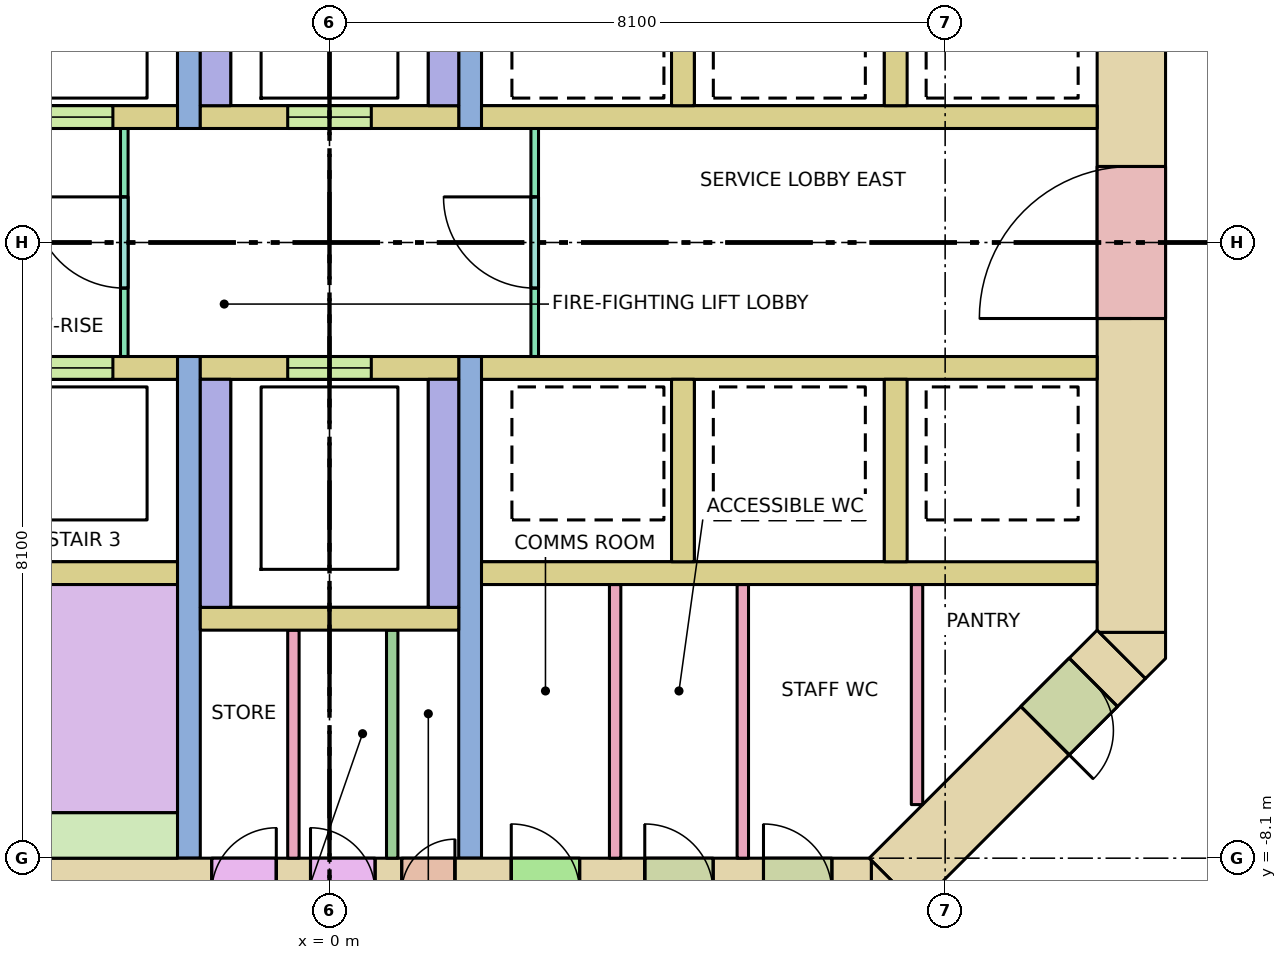
"""IFC4 building model, lengths in metres.
Left out: names, types, materials, properties, quantities, classifications, styles, units other than length and angle.
Written with IfcOpenShell. Run it as: python <this file> out.ifc"""

import sys

from ifc_helpers import new_model, si_unit, direction, frame, frame_2d, origin, place, context, subcontext, project, spatial, polyline, rectangle, outline, extrude, element, fill, save


model = new_model("IFC4")
c1 = context("Model", 3, precision=1e-05, world=origin(), true_north=direction((0.0, 1.0)))
c2 = subcontext(c1, "Body", "Model", "MODEL_VIEW")
j1 = project(units=[si_unit("LENGTHUNIT", "METRE"), si_unit("PLANEANGLEUNIT", "RADIAN")], contexts=[c1])
p1 = place(None, origin())
s1 = spatial("IfcSite", under=j1, at=p1, CompositionType="ELEMENT")
p2 = place(p1, origin())
s2 = spatial("IfcBuilding", under=s1, at=p2, CompositionType="ELEMENT")
p3 = place(p2, frame((0.0, 0.0, 20.0)))
s3 = spatial("IfcBuildingStorey", under=s2, at=p3, CompositionType="ELEMENT", Elevation=20.0)
p4 = place(p3, frame((-7.13, -8.55, -0.32), z_axis=(0.0, 0.0, 1.0), x_axis=(1.0, 0.0, 0.0)))
e1 = element("IfcWall", 1, at=p4, inside=s3, PredefinedType="SHEAR", context=c2, shape_type="SweptSolid", body=[
    extrude(rectangle(XDim=14.26, YDim=0.9, at=frame_2d((7.13, 0.0))), origin(), (0.0, 0.0, 1.0), 7.04),
])
p5 = place(p4, frame((8.08, 0.0, 0.32)))
e2 = element("IfcOpeningElement", 2, at=p5, cuts=e1, PredefinedType="OPENING", context=c2, shape_type="SweptSolid", body=[
    extrude(rectangle(XDim=0.7, YDim=2.1, at=frame_2d((0.35, 1.05))), frame((0.0, 0.46, 0.0), z_axis=(0.0, -1.0, 0.0), x_axis=(1.0, 0.0, 0.0)), (0.0, 0.0, 1.0), 0.92),
])
p6 = place(p4, frame((5.58, 0.0, 0.32)))
e3 = element("IfcOpeningElement", 3, at=p6, cuts=e1, PredefinedType="OPENING", context=c2, shape_type="SweptSolid", body=[
    extrude(rectangle(XDim=0.85, YDim=2.1, at=frame_2d((0.425, 1.05))), frame((0.0, 0.46, 0.0), z_axis=(0.0, -1.0, 0.0), x_axis=(1.0, 0.0, 0.0)), (0.0, 0.0, 1.0), 0.92),
])
p7 = place(p4, frame((6.88, 0.0, 0.32)))
e4 = element("IfcOpeningElement", 4, at=p7, cuts=e1, PredefinedType="OPENING", context=c2, shape_type="SweptSolid", body=[
    extrude(rectangle(XDim=0.85, YDim=2.1, at=frame_2d((0.425, 1.05))), frame((0.0, 0.46, 0.0), z_axis=(0.0, -1.0, 0.0), x_axis=(1.0, 0.0, 0.0)), (0.0, 0.0, 1.0), 0.92),
])
p8 = place(p4, frame((9.521, 0.0, 0.32)))
e5 = element("IfcOpeningElement", 5, at=p8, cuts=e1, PredefinedType="OPENING", context=c2, shape_type="SweptSolid", body=[
    extrude(rectangle(XDim=0.9, YDim=2.1, at=frame_2d((0.45, 1.05))), frame((0.0, 0.46, 0.0), z_axis=(0.0, -1.0, 0.0), x_axis=(1.0, 0.0, 0.0)), (0.0, 0.0, 1.0), 0.92),
])
p9 = place(p4, frame((11.278, 0.0, 0.32)))
e6 = element("IfcOpeningElement", 6, at=p9, cuts=e1, PredefinedType="OPENING", context=c2, shape_type="SweptSolid", body=[
    extrude(rectangle(XDim=0.9, YDim=2.1, at=frame_2d((0.45, 1.05))), frame((0.0, 0.46, 0.0), z_axis=(0.0, -1.0, 0.0), x_axis=(1.0, 0.0, 0.0)), (0.0, 0.0, 1.0), 0.92),
])
p10 = place(p4, frame((12.84, 0.0, 0.32)))
e7 = element("IfcOpeningElement", 7, at=p10, cuts=e1, PredefinedType="OPENING", context=c2, shape_type="SweptSolid", body=[
    extrude(rectangle(XDim=0.9, YDim=2.1, at=frame_2d((0.45, 1.05))), frame((0.0, 0.46, 0.0), z_axis=(0.0, -1.0, 0.0), x_axis=(1.0, 0.0, 0.0)), (0.0, 0.0, 1.0), 0.92),
])
p11 = place(p3, frame((10.55, -5.13, -0.32), z_axis=(0.0, 0.0, 1.0), x_axis=(0.0, 1.0, 0.0)))
e8 = element("IfcWall", 8, at=p11, inside=s3, PredefinedType="SHEAR", context=c2, shape_type="SweptSolid", body=[
    extrude(rectangle(XDim=10.26, YDim=0.9, at=frame_2d((5.13, 0.0))), origin(), (0.0, 0.0, 1.0), 7.04),
])
p12 = place(p11, frame((4.13, 0.0, 0.32)))
e9 = element("IfcOpeningElement", 9, at=p12, cuts=e8, PredefinedType="OPENING", context=c2, shape_type="SweptSolid", body=[
    extrude(rectangle(XDim=2.0, YDim=2.1, at=frame_2d((1.0, 1.05))), frame((0.0, 0.46, 0.0), z_axis=(0.0, -1.0, 0.0), x_axis=(1.0, 0.0, 0.0)), (0.0, 0.0, 1.0), 0.92),
])
p13 = place(p3, frame((10.418, -5.418, -0.32), z_axis=(0.0, 0.0, 1.0), x_axis=(-0.707106781187, -0.707106781187, 0.0)))
e10 = element("IfcWall", 10, at=p13, inside=s3, PredefinedType="SHEAR", context=c2, shape_type="SweptSolid", body=[
    extrude(rectangle(XDim=4.243, YDim=0.9, at=frame_2d((2.121, 0.0))), origin(), (0.0, 0.0, 1.0), 7.04),
])
p14 = place(p13, frame((0.52, 0.0, 0.32)))
e11 = element("IfcOpeningElement", 11, at=p14, cuts=e10, PredefinedType="OPENING", context=c2, shape_type="SweptSolid", body=[
    extrude(rectangle(XDim=0.9, YDim=2.1, at=frame_2d((0.45, 1.05))), frame((0.0, 0.46, 0.0), z_axis=(0.0, -1.0, 0.0), x_axis=(1.0, 0.0, 0.0)), (0.0, 0.0, 1.0), 0.92),
])
p15 = place(p3, frame((0.0, 0.0, -0.32)))
e12 = element("IfcWall", 12, at=p15, inside=s3, PredefinedType="SHEAR", context=c2, shape_type="SweptSolid", body=[
    extrude(outline(polyline([(7.473, -9.0), (7.13, -9.0), (7.13, -8.13), (7.736, -8.736), (7.473, -9.0)])), origin(), (0.0, 0.0, 1.0), 7.04),
])
p16 = place(p3, frame((0.0, 0.0, -0.32)))
e13 = element("IfcWall", 13, at=p16, inside=s3, PredefinedType="SHEAR", context=c2, shape_type="SweptSolid", body=[
    extrude(outline(polyline([(11.0, -5.473), (10.736, -5.736), (10.13, -5.13), (11.0, -5.13), (11.0, -5.473)])), origin(), (0.0, 0.0, 1.0), 7.04),
])
for number, where, z_axis, x_axis in (
    (14, (-10.1, -4.35, 0.0), (0.0, 0.0, 1.0), (1.0, 0.0, 0.0)),
    (15, (2.0, -4.35, 0.0), (0.0, 0.0, 1.0), (1.0, 0.0, 0.0)),
):
    element("IfcWall", number, at=place(p3, frame(where, z_axis=z_axis, x_axis=x_axis)), inside=s3, PredefinedType="SOLIDWALL", context=c2, shape_type="SweptSolid", body=[
        extrude(rectangle(XDim=8.1, YDim=0.3, at=frame_2d((4.05, 0.0))), origin(), (0.0, 0.0, 1.0), 6.72),
    ])
p17 = place(p3, frame((-10.1, 1.65, 0.0), z_axis=(0.0, 0.0, 1.0), x_axis=(1.0, 0.0, 0.0)))
e16 = element("IfcWall", 16, at=p17, inside=s3, PredefinedType="SOLIDWALL", context=c2, shape_type="SweptSolid", body=[
    extrude(rectangle(XDim=8.1, YDim=0.3, at=frame_2d((4.05, 0.0))), origin(), (0.0, 0.0, 1.0), 6.72),
])
p18 = place(p17, frame((0.7, 0.0, 0.0)))
e17 = element("IfcOpeningElement", 17, at=p18, cuts=e16, PredefinedType="OPENING", context=c2, shape_type="SweptSolid", body=[
    extrude(rectangle(XDim=1.1, YDim=2.1, at=frame_2d((0.55, 1.05))), frame((0.0, 0.16, 0.0), z_axis=(0.0, -1.0, 0.0), x_axis=(1.0, 0.0, 0.0)), (0.0, 0.0, 1.0), 0.32),
])
p19 = place(p17, frame((3.5, 0.0, 0.0)))
e18 = element("IfcOpeningElement", 18, at=p19, cuts=e16, PredefinedType="OPENING", context=c2, shape_type="SweptSolid", body=[
    extrude(rectangle(XDim=1.1, YDim=2.1, at=frame_2d((0.55, 1.05))), frame((0.0, 0.16, 0.0), z_axis=(0.0, -1.0, 0.0), x_axis=(1.0, 0.0, 0.0)), (0.0, 0.0, 1.0), 0.32),
])
p20 = place(p17, frame((6.15, 0.0, 0.0)))
e19 = element("IfcOpeningElement", 19, at=p20, cuts=e16, PredefinedType="OPENING", context=c2, shape_type="SweptSolid", body=[
    extrude(rectangle(XDim=1.1, YDim=2.1, at=frame_2d((0.55, 1.05))), frame((0.0, 0.16, 0.0), z_axis=(0.0, -1.0, 0.0), x_axis=(1.0, 0.0, 0.0)), (0.0, 0.0, 1.0), 0.32),
])
p21 = place(p3, frame((-10.1, -1.65, 0.0), z_axis=(0.0, 0.0, 1.0), x_axis=(1.0, 0.0, 0.0)))
e20 = element("IfcWall", 20, at=p21, inside=s3, PredefinedType="SOLIDWALL", context=c2, shape_type="SweptSolid", body=[
    extrude(rectangle(XDim=8.1, YDim=0.3, at=frame_2d((4.05, 0.0))), origin(), (0.0, 0.0, 1.0), 6.72),
])
p22 = place(p21, frame((0.7, 0.0, 0.0)))
e21 = element("IfcOpeningElement", 21, at=p22, cuts=e20, PredefinedType="OPENING", context=c2, shape_type="SweptSolid", body=[
    extrude(rectangle(XDim=1.1, YDim=2.1, at=frame_2d((0.55, 1.05))), frame((0.0, 0.16, 0.0), z_axis=(0.0, -1.0, 0.0), x_axis=(1.0, 0.0, 0.0)), (0.0, 0.0, 1.0), 0.32),
])
p23 = place(p21, frame((3.5, 0.0, 0.0)))
e22 = element("IfcOpeningElement", 22, at=p23, cuts=e20, PredefinedType="OPENING", context=c2, shape_type="SweptSolid", body=[
    extrude(rectangle(XDim=1.1, YDim=2.1, at=frame_2d((0.55, 1.05))), frame((0.0, 0.16, 0.0), z_axis=(0.0, -1.0, 0.0), x_axis=(1.0, 0.0, 0.0)), (0.0, 0.0, 1.0), 0.32),
])
p24 = place(p21, frame((6.15, 0.0, 0.0)))
e23 = element("IfcOpeningElement", 23, at=p24, cuts=e20, PredefinedType="OPENING", context=c2, shape_type="SweptSolid", body=[
    extrude(rectangle(XDim=1.1, YDim=2.1, at=frame_2d((0.55, 1.05))), frame((0.0, 0.16, 0.0), z_axis=(0.0, -1.0, 0.0), x_axis=(1.0, 0.0, 0.0)), (0.0, 0.0, 1.0), 0.32),
])
for number, where, z_axis, x_axis in (
    (24, (2.0, 1.65, 0.0), (0.0, 0.0, 1.0), (1.0, 0.0, 0.0)),
    (25, (2.0, -1.65, 0.0), (0.0, 0.0, 1.0), (1.0, 0.0, 0.0)),
):
    element("IfcWall", number, at=place(p3, frame(where, z_axis=z_axis, x_axis=x_axis)), inside=s3, PredefinedType="SOLIDWALL", context=c2, shape_type="SweptSolid", body=[
        extrude(rectangle(XDim=8.1, YDim=0.3, at=frame_2d((4.05, 0.0))), origin(), (0.0, 0.0, 1.0), 6.72),
    ])
for number, where, z_axis, x_axis in (
    (26, (4.65, 1.8, 0.0), (0.0, 0.0, 1.0), (0.0, 1.0, 0.0)),
    (27, (4.65, -4.2, 0.0), (0.0, 0.0, 1.0), (0.0, 1.0, 0.0)),
    (28, (7.45, 1.8, 0.0), (0.0, 0.0, 1.0), (0.0, 1.0, 0.0)),
    (29, (7.45, -4.2, 0.0), (0.0, 0.0, 1.0), (0.0, 1.0, 0.0)),
):
    element("IfcWall", number, at=place(p3, frame(where, z_axis=z_axis, x_axis=x_axis)), inside=s3, PredefinedType="SOLIDWALL", context=c2, shape_type="SweptSolid", body=[
        extrude(rectangle(XDim=2.4, YDim=0.3, at=frame_2d((1.2, 0.0))), origin(), (0.0, 0.0, 1.0), 6.72),
    ])
for number, where, z_axis, x_axis in (
    (30, (-1.85, 1.5, 0.0), (0.0, 0.0, 1.0), (0.0, 1.0, 0.0)),
    (31, (-1.85, -8.1, 0.0), (0.0, 0.0, 1.0), (0.0, 1.0, 0.0)),
    (32, (1.85, 1.5, 0.0), (0.0, 0.0, 1.0), (0.0, 1.0, 0.0)),
    (33, (1.85, -8.1, 0.0), (0.0, 0.0, 1.0), (0.0, 1.0, 0.0)),
):
    element("IfcWall", number, at=place(p3, frame(where, z_axis=z_axis, x_axis=x_axis)), inside=s3, PredefinedType="SHEAR", context=c2, shape_type="SweptSolid", body=[
        extrude(rectangle(XDim=6.6, YDim=0.3, at=frame_2d((3.3, 0.0))), origin(), (0.0, 0.0, 1.0), 6.72),
    ])
p25 = place(p3, frame((-1.7, 1.65, 0.0), z_axis=(0.0, 0.0, 1.0), x_axis=(1.0, 0.0, 0.0)))
e34 = element("IfcWall", 34, at=p25, inside=s3, PredefinedType="SOLIDWALL", context=c2, shape_type="SweptSolid", body=[
    extrude(rectangle(XDim=3.4, YDim=0.3, at=frame_2d((1.7, 0.0))), origin(), (0.0, 0.0, 1.0), 6.72),
])
p26 = place(p25, frame((1.15, 0.0, 0.0)))
e35 = element("IfcOpeningElement", 35, at=p26, cuts=e34, PredefinedType="OPENING", context=c2, shape_type="SweptSolid", body=[
    extrude(rectangle(XDim=1.1, YDim=2.1, at=frame_2d((0.55, 1.05))), frame((0.0, 0.16, 0.0), z_axis=(0.0, -1.0, 0.0), x_axis=(1.0, 0.0, 0.0)), (0.0, 0.0, 1.0), 0.32),
])
p27 = place(p3, frame((-1.7, -1.65, 0.0), z_axis=(0.0, 0.0, 1.0), x_axis=(1.0, 0.0, 0.0)))
e36 = element("IfcWall", 36, at=p27, inside=s3, PredefinedType="SOLIDWALL", context=c2, shape_type="SweptSolid", body=[
    extrude(rectangle(XDim=3.4, YDim=0.3, at=frame_2d((1.7, 0.0))), origin(), (0.0, 0.0, 1.0), 6.72),
])
p28 = place(p27, frame((1.15, 0.0, 0.0)))
e37 = element("IfcOpeningElement", 37, at=p28, cuts=e36, PredefinedType="OPENING", context=c2, shape_type="SweptSolid", body=[
    extrude(rectangle(XDim=1.1, YDim=2.1, at=frame_2d((0.55, 1.05))), frame((0.0, 0.16, 0.0), z_axis=(0.0, -1.0, 0.0), x_axis=(1.0, 0.0, 0.0)), (0.0, 0.0, 1.0), 0.32),
])
for number, where, z_axis, x_axis in (
    (38, (-1.5, 1.8, 0.0), (0.0, 0.0, 1.0), (0.0, 1.0, 0.0)),
    (39, (-1.5, -4.8, 0.0), (0.0, 0.0, 1.0), (0.0, 1.0, 0.0)),
    (40, (1.5, 1.8, 0.0), (0.0, 0.0, 1.0), (0.0, 1.0, 0.0)),
    (41, (1.5, -4.8, 0.0), (0.0, 0.0, 1.0), (0.0, 1.0, 0.0)),
):
    element("IfcWall", number, at=place(p3, frame(where, z_axis=z_axis, x_axis=x_axis)), inside=s3, PredefinedType="SOLIDWALL", context=c2, shape_type="SweptSolid", body=[
        extrude(rectangle(XDim=3.0, YDim=0.4, at=frame_2d((1.5, 0.0))), origin(), (0.0, 0.0, 1.0), 6.72),
    ])
p29 = place(p3, frame((-1.7, -4.95, 0.0), z_axis=(0.0, 0.0, 1.0), x_axis=(1.0, 0.0, 0.0)))
e42 = element("IfcWall", 42, at=p29, inside=s3, PredefinedType="SOLIDWALL", context=c2, shape_type="SweptSolid", body=[
    extrude(rectangle(XDim=3.4, YDim=0.3, at=frame_2d((1.7, 0.0))), origin(), (0.0, 0.0, 1.0), 6.72),
])
p30 = place(p3, frame((-7.37, -7.8, 0.0), z_axis=(0.0, 0.0, 1.0), x_axis=(1.0, 0.0, 0.0)))
e43 = element("IfcWall", 43, at=p30, inside=s3, PredefinedType="SHEAR", context=c2, shape_type="SweptSolid", body=[
    extrude(rectangle(XDim=5.37, YDim=0.6, at=frame_2d((2.685, 0.0))), origin(), (0.0, 0.0, 1.0), 6.72),
])
p31 = place(p3, frame((-2.7, -1.5, 0.0), z_axis=(0.0, 0.0, 1.0), x_axis=(0.0, 1.0, 0.0)))
e44 = element("IfcWall", 44, at=p31, inside=s3, PredefinedType="PARTITIONING", context=c2, shape_type="SweptSolid", body=[
    extrude(rectangle(XDim=3.0, YDim=0.1, at=frame_2d((1.5, 0.0))), origin(), (0.0, 0.0, 1.0), 6.72),
])
p32 = place(p31, frame((0.9, 0.0, 0.0)))
e45 = element("IfcOpeningElement", 45, at=p32, cuts=e44, PredefinedType="OPENING", context=c2, shape_type="SweptSolid", body=[
    extrude(rectangle(XDim=1.2, YDim=2.1, at=frame_2d((0.6, 1.05))), frame((0.0, 0.06, 0.0), z_axis=(0.0, -1.0, 0.0), x_axis=(1.0, 0.0, 0.0)), (0.0, 0.0, 1.0), 0.12),
])
p33 = place(p3, frame((2.7, -1.5, 0.0), z_axis=(0.0, 0.0, 1.0), x_axis=(0.0, 1.0, 0.0)))
e46 = element("IfcWall", 46, at=p33, inside=s3, PredefinedType="PARTITIONING", context=c2, shape_type="SweptSolid", body=[
    extrude(rectangle(XDim=3.0, YDim=0.1, at=frame_2d((1.5, 0.0))), origin(), (0.0, 0.0, 1.0), 6.72),
])
p34 = place(p33, frame((0.9, 0.0, 0.0)))
e47 = element("IfcOpeningElement", 47, at=p34, cuts=e46, PredefinedType="OPENING", context=c2, shape_type="SweptSolid", body=[
    extrude(rectangle(XDim=1.2, YDim=2.1, at=frame_2d((0.6, 1.05))), frame((0.0, 0.06, 0.0), z_axis=(0.0, -1.0, 0.0), x_axis=(1.0, 0.0, 0.0)), (0.0, 0.0, 1.0), 0.12),
])
for number, where, z_axis, x_axis in (
    (48, (0.825, -8.1, 0.0), (0.0, 0.0, 1.0), (0.0, 1.0, 0.0)),
    (49, (-0.475, -8.1, 0.0), (0.0, 0.0, 1.0), (0.0, 1.0, 0.0)),
):
    element("IfcWall", number, at=place(p3, frame(where, z_axis=z_axis, x_axis=x_axis)), inside=s3, PredefinedType="PARTITIONING", context=c2, shape_type="SweptSolid", body=[
        extrude(rectangle(XDim=3.0, YDim=0.15, at=frame_2d((1.5, 0.0))), origin(), (0.0, 0.0, 1.0), 6.72),
    ])
for number, where, z_axis, x_axis in (
    (50, (3.758, -8.1, 0.0), (0.0, 0.0, 1.0), (0.0, 1.0, 0.0)),
    (51, (5.438, -8.1, 0.0), (0.0, 0.0, 1.0), (0.0, 1.0, 0.0)),
):
    element("IfcWall", number, at=place(p3, frame(where, z_axis=z_axis, x_axis=x_axis)), inside=s3, PredefinedType="PARTITIONING", context=c2, shape_type="SweptSolid", body=[
        extrude(rectangle(XDim=3.6, YDim=0.15, at=frame_2d((1.8, 0.0))), origin(), (0.0, 0.0, 1.0), 6.72),
    ])
p35 = place(p3, frame((7.73, -7.395, 0.0), z_axis=(0.0, 0.0, 1.0), x_axis=(0.0, 1.0, 0.0)))
e52 = element("IfcWall", 52, at=p35, inside=s3, PredefinedType="PARTITIONING", context=c2, shape_type="SweptSolid", body=[
    extrude(rectangle(XDim=2.895, YDim=0.15, at=frame_2d((1.448, 0.0))), origin(), (0.0, 0.0, 1.0), 6.72),
])
p36 = place(p20, origin())
e53 = element("IfcDoor", 53, at=p36, inside=s3, OperationType="DOUBLE_DOOR_SLIDING", PredefinedType="DOOR", context=c2, shape_type="SweptSolid", body=[
    extrude(rectangle(XDim=1.1, YDim=2.1, at=frame_2d((0.55, 1.05))), frame((0.0, 0.025, 0.0), z_axis=(0.0, -1.0, 0.0), x_axis=(1.0, 0.0, 0.0)), (0.0, 0.0, 1.0), 0.05),
])
fill(e19, e53)
p37 = place(p24, origin())
e54 = element("IfcDoor", 54, at=p37, inside=s3, OperationType="DOUBLE_DOOR_SLIDING", PredefinedType="DOOR", context=c2, shape_type="SweptSolid", body=[
    extrude(rectangle(XDim=1.1, YDim=2.1, at=frame_2d((0.55, 1.05))), frame((0.0, 0.025, 0.0), z_axis=(0.0, -1.0, 0.0), x_axis=(1.0, 0.0, 0.0)), (0.0, 0.0, 1.0), 0.05),
])
fill(e23, e54)
p38 = place(p26, origin())
e55 = element("IfcDoor", 55, at=p38, inside=s3, OperationType="DOUBLE_DOOR_SLIDING", PredefinedType="DOOR", context=c2, shape_type="SweptSolid", body=[
    extrude(rectangle(XDim=1.1, YDim=2.1, at=frame_2d((0.55, 1.05))), frame((0.0, 0.025, 0.0), z_axis=(0.0, -1.0, 0.0), x_axis=(1.0, 0.0, 0.0)), (0.0, 0.0, 1.0), 0.05),
])
fill(e35, e55)
p39 = place(p28, origin())
e56 = element("IfcDoor", 56, at=p39, inside=s3, OperationType="DOUBLE_DOOR_SLIDING", PredefinedType="DOOR", context=c2, shape_type="SweptSolid", body=[
    extrude(rectangle(XDim=1.1, YDim=2.1, at=frame_2d((0.55, 1.05))), frame((0.0, 0.025, 0.0), z_axis=(0.0, -1.0, 0.0), x_axis=(1.0, 0.0, 0.0)), (0.0, 0.0, 1.0), 0.05),
])
fill(e37, e56)
p40 = place(p12, origin())
e57 = element("IfcDoor", 57, at=p40, inside=s3, OperationType="DOUBLE_DOOR_SINGLE_SWING", PredefinedType="DOOR", context=c2, shape_type="SweptSolid", body=[
    extrude(rectangle(XDim=2.0, YDim=2.1, at=frame_2d((1.0, 1.05))), frame((0.0, 0.025, 0.0), z_axis=(0.0, -1.0, 0.0), x_axis=(1.0, 0.0, 0.0)), (0.0, 0.0, 1.0), 0.05),
])
fill(e9, e57)
p41 = place(p32, origin())
e58 = element("IfcDoor", 58, at=p41, inside=s3, OperationType="SINGLE_SWING_RIGHT", PredefinedType="DOOR", context=c2, shape_type="SweptSolid", body=[
    extrude(rectangle(XDim=1.2, YDim=2.1, at=frame_2d((0.6, 1.05))), frame((0.0, 0.025, 0.0), z_axis=(0.0, -1.0, 0.0), x_axis=(1.0, 0.0, 0.0)), (0.0, 0.0, 1.0), 0.05),
])
fill(e45, e58)
p42 = place(p34, origin())
e59 = element("IfcDoor", 59, at=p42, inside=s3, OperationType="SINGLE_SWING_RIGHT", PredefinedType="DOOR", context=c2, shape_type="SweptSolid", body=[
    extrude(rectangle(XDim=1.2, YDim=2.1, at=frame_2d((0.6, 1.05))), frame((0.0, 0.025, 0.0), z_axis=(0.0, -1.0, 0.0), x_axis=(1.0, 0.0, 0.0)), (0.0, 0.0, 1.0), 0.05),
])
fill(e47, e59)
p43 = place(p14, origin())
e60 = element("IfcDoor", 60, at=p43, inside=s3, OperationType="SINGLE_SWING_RIGHT", PredefinedType="DOOR", context=c2, shape_type="SweptSolid", body=[
    extrude(rectangle(XDim=0.9, YDim=2.1, at=frame_2d((0.45, 1.05))), frame((0.0, 0.025, 0.0), z_axis=(0.0, -1.0, 0.0), x_axis=(1.0, 0.0, 0.0)), (0.0, 0.0, 1.0), 0.05),
])
fill(e11, e60)
save(model, sys.argv[1])
